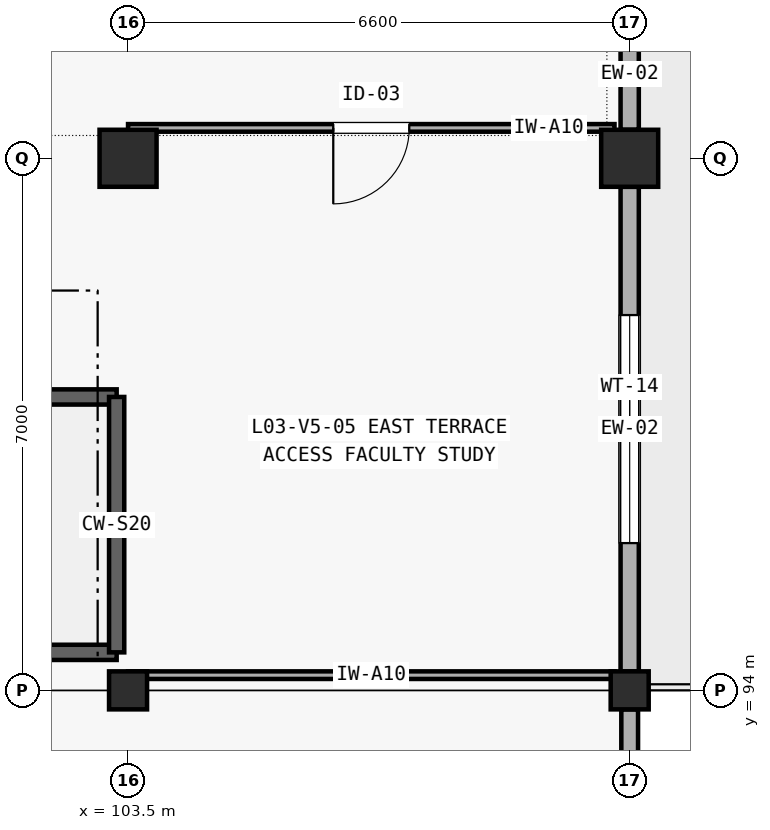
"""IFC4 building model, lengths in metres.
Left out: names, types, materials, properties, quantities, classifications, styles, units other than length and angle.
Written with IfcOpenShell. Run it as: python <this file> out.ifc"""

import sys

from ifc_helpers import new_model, si_unit, direction, frame, frame_2d, origin, origin_2d, place, context, subcontext, project, spatial, rectangle, extrude, element, fill, save


model = new_model("IFC4")
c1 = context("Model", 3, precision=1e-05, world=origin(), true_north=direction((0.0, 1.0)))
c2 = subcontext(c1, "Body", "Model", "MODEL_VIEW")
j1 = project(units=[si_unit("LENGTHUNIT", "METRE"), si_unit("PLANEANGLEUNIT", "RADIAN")], contexts=[c1])
p1 = place(None, origin())
s1 = spatial("IfcSite", under=j1, at=p1, CompositionType="ELEMENT")
p2 = place(p1, origin())
s2 = spatial("IfcBuilding", under=s1, at=p2, CompositionType="ELEMENT")
p3 = place(p2, frame((0.0, 0.0, 12.6)))
s3 = spatial("IfcBuildingStorey", under=s2, at=p3, CompositionType="ELEMENT", Elevation=12.6)
p4 = place(p3, frame((103.5, 94.0, 0.0), z_axis=(0.0, 0.0, 1.0), x_axis=(1.0, 0.0, 0.0)))
e1 = element("IfcColumn", 1, at=p4, inside=s3, PredefinedType="COLUMN", context=c2, shape_type="SweptSolid", body=[
    extrude(rectangle(XDim=0.5, YDim=0.5, at=origin_2d()), origin(), (0.0, 0.0, 1.0), 4.2),
])
p5 = place(p3, frame((103.5, 101.0, 0.0), z_axis=(0.0, 0.0, 1.0), x_axis=(1.0, 0.0, 0.0)))
e2 = element("IfcColumn", 2, at=p5, inside=s3, PredefinedType="COLUMN", context=c2, shape_type="SweptSolid", body=[
    extrude(rectangle(XDim=0.75, YDim=0.75, at=origin_2d()), origin(), (0.0, 0.0, 1.0), 4.2),
])
p6 = place(p3, frame((110.1, 94.0, 0.0), z_axis=(0.0, 0.0, 1.0), x_axis=(1.0, 0.0, 0.0)))
e3 = element("IfcColumn", 3, at=p6, inside=s3, PredefinedType="COLUMN", context=c2, shape_type="SweptSolid", body=[
    extrude(rectangle(XDim=0.5, YDim=0.5, at=origin_2d()), origin(), (0.0, 0.0, 1.0), 4.2),
])
p7 = place(p3, frame((110.1, 101.0, 0.0), z_axis=(0.0, 0.0, 1.0), x_axis=(1.0, 0.0, 0.0)))
e4 = element("IfcColumn", 4, at=p7, inside=s3, PredefinedType="COLUMN", context=c2, shape_type="SweptSolid", body=[
    extrude(rectangle(XDim=0.75, YDim=0.75, at=origin_2d()), origin(), (0.0, 0.0, 1.0), 4.2),
])
p8 = place(p3, frame((110.1, 87.25, 0.0), z_axis=(0.0, 0.0, 1.0), x_axis=(0.0, 1.0, 0.0)))
e5 = element("IfcWall", 5, at=p8, inside=s3, PredefinedType="SOLIDWALL", context=c2, shape_type="SweptSolid", body=[
    extrude(rectangle(XDim=6.5, YDim=0.22, at=frame_2d((3.25, 0.0))), origin(), (0.0, 0.0, 1.0), 3.325),
])
p9 = place(p8, frame((2.05, 0.0, 0.85)))
e6 = element("IfcOpeningElement", 6, at=p9, cuts=e5, PredefinedType="OPENING", context=c2, shape_type="SweptSolid", body=[
    extrude(rectangle(XDim=2.4, YDim=1.5, at=frame_2d((1.2, 0.75))), frame((0.0, 0.12, 0.0), z_axis=(0.0, -1.0, 0.0), x_axis=(1.0, 0.0, 0.0)), (0.0, 0.0, 1.0), 0.24),
])
p10 = place(p3, frame((110.1, 94.25, 0.0), z_axis=(0.0, 0.0, 1.0), x_axis=(0.0, 1.0, 0.0)))
e7 = element("IfcWall", 7, at=p10, inside=s3, PredefinedType="SOLIDWALL", context=c2, shape_type="SweptSolid", body=[
    extrude(rectangle(XDim=6.375, YDim=0.24, at=frame_2d((3.188, 0.0))), origin(), (0.0, 0.0, 1.0), 3.565),
])
p11 = place(p10, frame((1.688, 0.0, 0.85)))
e8 = element("IfcOpeningElement", 8, at=p11, cuts=e7, PredefinedType="OPENING", context=c2, shape_type="SweptSolid", body=[
    extrude(rectangle(XDim=3.0, YDim=1.5, at=frame_2d((1.5, 0.75))), frame((0.0, 0.13, 0.0), z_axis=(0.0, -1.0, 0.0), x_axis=(1.0, 0.0, 0.0)), (0.0, 0.0, 1.0), 0.26),
])
p12 = place(p3, frame((110.1, 101.375, 0.0), z_axis=(0.0, 0.0, 1.0), x_axis=(0.0, 1.0, 0.0)))
e9 = element("IfcWall", 9, at=p12, inside=s3, PredefinedType="SOLIDWALL", context=c2, shape_type="SweptSolid", body=[
    extrude(rectangle(XDim=6.25, YDim=0.24, at=frame_2d((3.125, 0.0))), origin(), (0.0, 0.0, 1.0), 3.565),
])
p13 = place(p12, frame((2.425, 0.0, 0.0)))
e10 = element("IfcOpeningElement", 10, at=p13, cuts=e9, PredefinedType="OPENING", context=c2, shape_type="SweptSolid", body=[
    extrude(rectangle(XDim=1.4, YDim=2.15, at=frame_2d((0.7, 1.075))), frame((0.0, 0.13, 0.0), z_axis=(0.0, -1.0, 0.0), x_axis=(1.0, 0.0, 0.0)), (0.0, 0.0, 1.0), 0.26),
])
p14 = place(p3, frame((97.05, 94.5, 0.0), z_axis=(0.0, 0.0, 1.0), x_axis=(1.0, 0.0, 0.0)))
e11 = element("IfcWall", 11, at=p14, inside=s3, PredefinedType="SHEAR", context=c2, shape_type="SweptSolid", body=[
    extrude(rectangle(XDim=6.3, YDim=0.2, at=frame_2d((3.15, 0.0))), origin(), (0.0, 0.0, 1.0), 4.2),
])
p15 = place(p3, frame((97.05, 97.86, 0.0), z_axis=(0.0, 0.0, 1.0), x_axis=(1.0, 0.0, 0.0)))
e12 = element("IfcWall", 12, at=p15, inside=s3, PredefinedType="SHEAR", context=c2, shape_type="SweptSolid", body=[
    extrude(rectangle(XDim=6.3, YDim=0.2, at=frame_2d((3.15, 0.0))), origin(), (0.0, 0.0, 1.0), 4.2),
])
p16 = place(p15, frame((0.32, 0.0, 0.0)))
e13 = element("IfcOpeningElement", 13, at=p16, cuts=e12, PredefinedType="OPENING", context=c2, shape_type="SweptSolid", body=[
    extrude(rectangle(XDim=1.2, YDim=2.15, at=frame_2d((0.6, 1.075))), frame((0.0, 0.11, 0.0), z_axis=(0.0, -1.0, 0.0), x_axis=(1.0, 0.0, 0.0)), (0.0, 0.0, 1.0), 0.22),
])
p17 = place(p3, frame((103.35, 94.5, 0.0), z_axis=(0.0, 0.0, 1.0), x_axis=(0.0, 1.0, 0.0)))
e14 = element("IfcWall", 14, at=p17, inside=s3, PredefinedType="SHEAR", context=c2, shape_type="SweptSolid", body=[
    extrude(rectangle(XDim=3.36, YDim=0.2, at=frame_2d((1.68, 0.0))), origin(), (0.0, 0.0, 1.0), 4.2),
])
p18 = place(p3, frame((103.5, 94.2, 0.0), z_axis=(0.0, 0.0, 1.0), x_axis=(1.0, 0.0, 0.0)))
e15 = element("IfcWall", 15, at=p18, inside=s3, PredefinedType="PARTITIONING", context=c2, shape_type="SweptSolid", body=[
    extrude(rectangle(XDim=6.4, YDim=0.1, at=frame_2d((3.2, 0.0))), origin(), (0.0, 0.0, 1.0), 3.405),
])
p19 = place(p3, frame((103.5, 101.4, 0.0), z_axis=(0.0, 0.0, 1.0), x_axis=(1.0, 0.0, 0.0)))
e16 = element("IfcWall", 16, at=p19, inside=s3, PredefinedType="PARTITIONING", context=c2, shape_type="SweptSolid", body=[
    extrude(rectangle(XDim=6.4, YDim=0.1, at=frame_2d((3.2, 0.0))), origin(), (0.0, 0.0, 1.0), 3.135),
])
p20 = place(p19, frame((2.7, 0.0, 0.0)))
e17 = element("IfcOpeningElement", 17, at=p20, cuts=e16, PredefinedType="OPENING", context=c2, shape_type="SweptSolid", body=[
    extrude(rectangle(XDim=1.0, YDim=2.1, at=frame_2d((0.5, 1.05))), frame((0.0, 0.06, 0.0), z_axis=(0.0, -1.0, 0.0), x_axis=(1.0, 0.0, 0.0)), (0.0, 0.0, 1.0), 0.12),
])
p21 = place(p11, origin())
e18 = element("IfcWindow", 18, at=p21, inside=s3, PartitioningType="SINGLE_PANEL", PredefinedType="WINDOW", context=c2, shape_type="SweptSolid", body=[
    extrude(rectangle(XDim=3.0, YDim=1.5, at=frame_2d((1.5, 0.75))), frame((0.0, 0.03, 0.0), z_axis=(0.0, -1.0, 0.0), x_axis=(1.0, 0.0, 0.0)), (0.0, 0.0, 1.0), 0.06),
])
fill(e8, e18)
p22 = place(p20, frame((1.0, 0.0, 0.0), z_axis=(0.0, 0.0, 1.0), x_axis=(-1.0, 0.0, 0.0)))
e19 = element("IfcDoor", 19, at=p22, inside=s3, OperationType="SINGLE_SWING_RIGHT", PredefinedType="DOOR", context=c2, shape_type="SweptSolid", body=[
    extrude(rectangle(XDim=1.0, YDim=2.1, at=frame_2d((0.5, 1.05))), frame((0.0, 0.025, 0.0), z_axis=(0.0, -1.0, 0.0), x_axis=(1.0, 0.0, 0.0)), (0.0, 0.0, 1.0), 0.05),
])
fill(e17, e19)
save(model, sys.argv[1])
